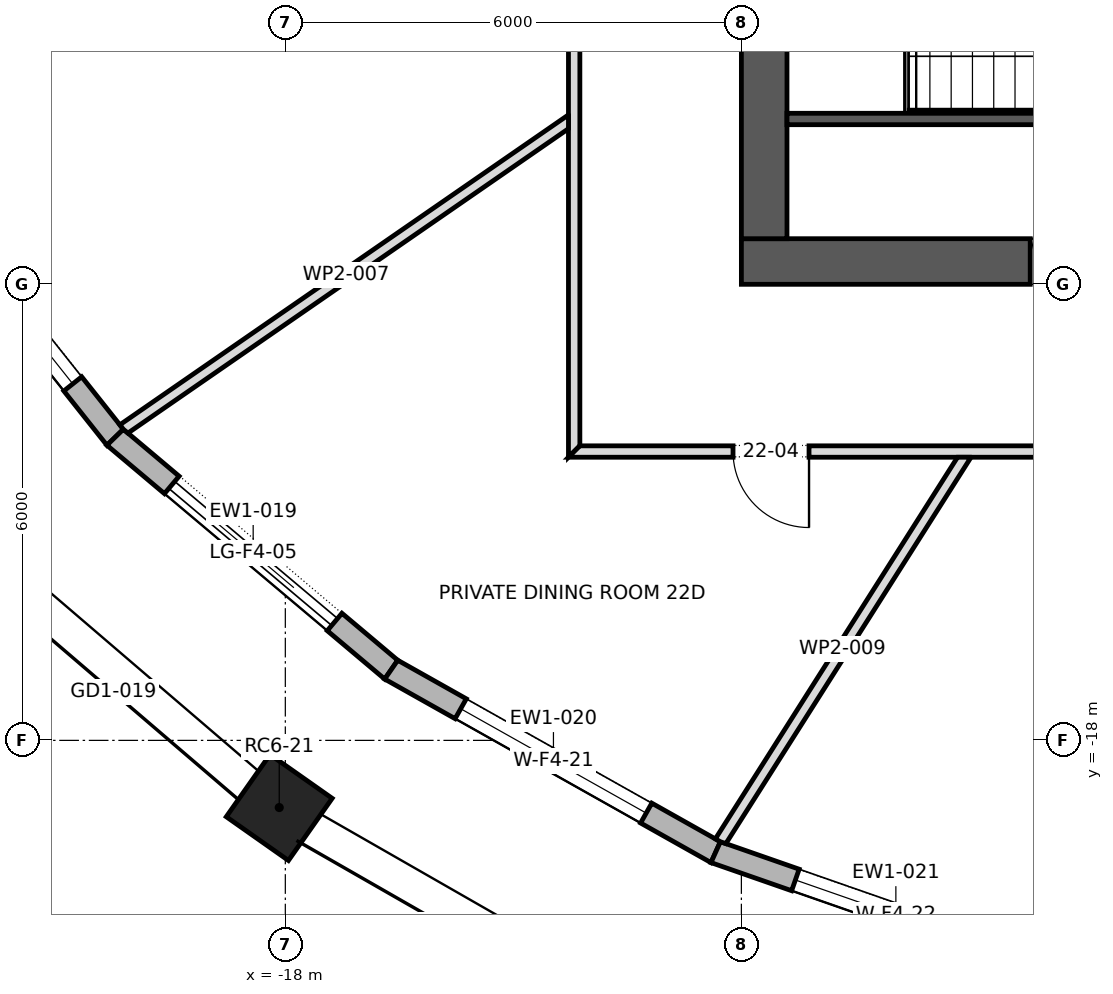
"""IFC4 building model, lengths in metres.
Left out: names, types, materials, properties, quantities, classifications, styles, units other than length and angle.
Written with IfcOpenShell. Run it as: python <this file> out.ifc"""

import sys

from ifc_helpers import new_model, si_unit, direction, frame, frame_2d, origin, origin_2d, place, context, subcontext, project, spatial, polyline, rectangle, outline, extrude, element, fill, save


model = new_model("IFC4")
c1 = context("Model", 3, precision=1e-05, world=origin(), true_north=direction((0.0, 1.0)))
c2 = subcontext(c1, "Body", "Model", "MODEL_VIEW")
j1 = project(units=[si_unit("LENGTHUNIT", "METRE"), si_unit("PLANEANGLEUNIT", "RADIAN")], contexts=[c1])
p1 = place(None, origin())
s1 = spatial("IfcSite", under=j1, at=p1, CompositionType="ELEMENT")
p2 = place(p1, origin())
s2 = spatial("IfcBuilding", under=s1, at=p2, CompositionType="ELEMENT")
p3 = place(p2, frame((0.0, 0.0, 312.3)))
s3 = spatial("IfcBuildingStorey", under=s2, at=p3, CompositionType="ELEMENT", Elevation=312.3)
p4 = place(p3, frame((-18.08, -18.884, 0.0), z_axis=(0.0, 0.0, 1.0), x_axis=(0.817906779671, -0.575350762377, 0.0)))
e1 = element("IfcColumn", 1, at=p4, inside=s3, PredefinedType="COLUMN", context=c2, shape_type="SweptSolid", body=[
    extrude(rectangle(XDim=1.0, YDim=1.0, at=origin_2d()), origin(), (0.0, 0.0, 1.0), 4.0),
])
p5 = place(p3, frame((-12.0, -11.7, 0.0), z_axis=(0.0, 0.0, 1.0), x_axis=(1.0, 0.0, 0.0)))
e2 = element("IfcWall", 2, at=p5, inside=s3, PredefinedType="SHEAR", context=c2, shape_type="SweptSolid", body=[
    extrude(rectangle(XDim=24.0, YDim=0.6, at=frame_2d((12.0, 0.0))), origin(), (0.0, 0.0, 1.0), 4.0),
])
p6 = place(p5, frame((9.975, 0.0, 0.0)))
e3 = element("IfcOpeningElement", 3, at=p6, cuts=e2, PredefinedType="OPENING", context=c2, shape_type="SweptSolid", body=[
    extrude(rectangle(XDim=0.9, YDim=2.1, at=frame_2d((0.45, 1.05))), frame((0.0, 0.312, 0.0), z_axis=(0.0, -1.0, 0.0), x_axis=(1.0, 0.0, 0.0)), (0.0, 0.0, 1.0), 0.624),
])
p7 = place(p5, frame((3.8, 0.0, 0.0)))
e4 = element("IfcOpeningElement", 4, at=p7, cuts=e2, PredefinedType="OPENING", context=c2, shape_type="SweptSolid", body=[
    extrude(rectangle(XDim=0.8, YDim=2.1, at=frame_2d((0.4, 1.05))), frame((0.0, 0.312, 0.0), z_axis=(0.0, -1.0, 0.0), x_axis=(1.0, 0.0, 0.0)), (0.0, 0.0, 1.0), 0.624),
])
p8 = place(p5, frame((5.8, 0.0, 0.0)))
e5 = element("IfcOpeningElement", 5, at=p8, cuts=e2, PredefinedType="OPENING", context=c2, shape_type="SweptSolid", body=[
    extrude(rectangle(XDim=0.8, YDim=2.1, at=frame_2d((0.4, 1.05))), frame((0.0, 0.312, 0.0), z_axis=(0.0, -1.0, 0.0), x_axis=(1.0, 0.0, 0.0)), (0.0, 0.0, 1.0), 0.624),
])
p9 = place(p5, frame((7.5, 0.0, 0.0)))
e6 = element("IfcOpeningElement", 6, at=p9, cuts=e2, PredefinedType="OPENING", context=c2, shape_type="SweptSolid", body=[
    extrude(rectangle(XDim=0.8, YDim=2.1, at=frame_2d((0.4, 1.05))), frame((0.0, 0.312, 0.0), z_axis=(0.0, -1.0, 0.0), x_axis=(1.0, 0.0, 0.0)), (0.0, 0.0, 1.0), 0.624),
])
p10 = place(p5, frame((15.85, 0.0, 0.0)))
e7 = element("IfcOpeningElement", 7, at=p10, cuts=e2, PredefinedType="OPENING", context=c2, shape_type="SweptSolid", body=[
    extrude(rectangle(XDim=0.8, YDim=2.1, at=frame_2d((0.4, 1.05))), frame((0.0, 0.312, 0.0), z_axis=(0.0, -1.0, 0.0), x_axis=(1.0, 0.0, 0.0)), (0.0, 0.0, 1.0), 0.624),
])
p11 = place(p3, frame((-11.7, -11.4, 0.0), z_axis=(0.0, 0.0, 1.0), x_axis=(0.0, 1.0, 0.0)))
e8 = element("IfcWall", 8, at=p11, inside=s3, PredefinedType="SHEAR", context=c2, shape_type="SweptSolid", body=[
    extrude(rectangle(XDim=22.8, YDim=0.6, at=frame_2d((11.4, 0.0))), origin(), (0.0, 0.0, 1.0), 4.0),
])
p12 = place(p11, frame((10.2, 0.0, 0.0)))
e9 = element("IfcOpeningElement", 9, at=p12, cuts=e8, PredefinedType="OPENING", context=c2, shape_type="SweptSolid", body=[
    extrude(rectangle(XDim=2.4, YDim=2.1, at=frame_2d((1.2, 1.05))), frame((0.0, 0.312, 0.0), z_axis=(0.0, -1.0, 0.0), x_axis=(1.0, 0.0, 0.0)), (0.0, 0.0, 1.0), 0.624),
])
p13 = place(p11, frame((18.925, 0.0, 0.0)))
e10 = element("IfcOpeningElement", 10, at=p13, cuts=e8, PredefinedType="OPENING", context=c2, shape_type="SweptSolid", body=[
    extrude(rectangle(XDim=1.2, YDim=2.1, at=frame_2d((0.6, 1.05))), frame((0.0, 0.312, 0.0), z_axis=(0.0, -1.0, 0.0), x_axis=(1.0, 0.0, 0.0)), (0.0, 0.0, 1.0), 0.624),
])
p14 = place(p11, frame((2.675, 0.0, 0.0)))
e11 = element("IfcOpeningElement", 11, at=p14, cuts=e8, PredefinedType="OPENING", context=c2, shape_type="SweptSolid", body=[
    extrude(rectangle(XDim=1.2, YDim=2.1, at=frame_2d((0.6, 1.05))), frame((0.0, 0.312, 0.0), z_axis=(0.0, -1.0, 0.0), x_axis=(1.0, 0.0, 0.0)), (0.0, 0.0, 1.0), 0.624),
])
p15 = place(p3, frame((-23.094, -10.415, 0.0), z_axis=(0.0, 0.0, 1.0), x_axis=(0.621682706372, -0.78326918272, 0.0)))
e12 = element("IfcWall", 12, at=p15, inside=s3, PredefinedType="STANDARD", context=c2, shape_type="SweptSolid", body=[
    extrude(outline(polyline([(-0.016, -0.15), (4.608, -0.15), (4.578, 0.15), (0.016, 0.15), (-0.016, -0.15)])), origin(), (0.0, 0.0, 1.0), 3.7),
])
p16 = place(p15, frame((0.896, 0.0, 0.6)))
e13 = element("IfcOpeningElement", 13, at=p16, cuts=e12, PredefinedType="OPENING", context=c2, shape_type="SweptSolid", body=[
    extrude(rectangle(XDim=2.8, YDim=2.65, at=frame_2d((1.4, 1.325))), frame((0.0, 0.162, 0.0), z_axis=(0.0, -1.0, 0.0), x_axis=(1.0, 0.0, 0.0)), (0.0, 0.0, 1.0), 0.324),
])
p17 = place(p3, frame((-20.239, -14.012, 0.0), z_axis=(0.0, 0.0, 1.0), x_axis=(0.765059193792, -0.643959959931, 0.0)))
e14 = element("IfcWall", 14, at=p17, inside=s3, PredefinedType="STANDARD", context=c2, shape_type="SweptSolid", body=[
    extrude(outline(polyline([(-0.015, -0.15), (4.762, -0.15), (4.734, 0.15), (0.015, 0.15), (-0.015, -0.15)])), origin(), (0.0, 0.0, 1.0), 3.7),
])
p18 = place(p17, frame((0.974, 0.0, 0.0)))
e15 = element("IfcOpeningElement", 15, at=p18, cuts=e14, PredefinedType="OPENING", context=c2, shape_type="SweptSolid", body=[
    extrude(rectangle(XDim=2.8, YDim=3.25, at=frame_2d((1.4, 1.625))), frame((0.0, 0.162, 0.0), z_axis=(0.0, -1.0, 0.0), x_axis=(1.0, 0.0, 0.0)), (0.0, 0.0, 1.0), 0.324),
])
p19 = place(p3, frame((-16.607, -17.07, 0.0), z_axis=(0.0, 0.0, 1.0), x_axis=(0.871570211895, -0.490270706588, 0.0)))
e16 = element("IfcWall", 16, at=p19, inside=s3, PredefinedType="STANDARD", context=c2, shape_type="SweptSolid", body=[
    extrude(outline(polyline([(-0.014, -0.15), (4.911, -0.15), (4.884, 0.15), (0.014, 0.15), (-0.014, -0.15)])), origin(), (0.0, 0.0, 1.0), 3.7),
])
p20 = place(p19, frame((1.049, 0.0, 0.6)))
e17 = element("IfcOpeningElement", 17, at=p20, cuts=e16, PredefinedType="OPENING", context=c2, shape_type="SweptSolid", body=[
    extrude(rectangle(XDim=2.8, YDim=2.65, at=frame_2d((1.4, 1.325))), frame((0.0, 0.162, 0.0), z_axis=(0.0, -1.0, 0.0), x_axis=(1.0, 0.0, 0.0)), (0.0, 0.0, 1.0), 0.324),
])
p21 = place(p3, frame((-12.338, -19.471, 0.0), z_axis=(0.0, 0.0, 1.0), x_axis=(0.944251863618, -0.329223963365, 0.0)))
e18 = element("IfcWall", 18, at=p21, inside=s3, PredefinedType="STANDARD", context=c2, shape_type="SweptSolid", body=[
    extrude(outline(polyline([(-0.013, -0.15), (5.034, -0.15), (5.009, 0.15), (0.013, 0.15), (-0.013, -0.15)])), origin(), (0.0, 0.0, 1.0), 3.7),
])
p22 = place(p21, frame((1.111, 0.0, 0.6)))
e19 = element("IfcOpeningElement", 19, at=p22, cuts=e18, PredefinedType="OPENING", context=c2, shape_type="SweptSolid", body=[
    extrude(rectangle(XDim=2.8, YDim=2.65, at=frame_2d((1.4, 1.325))), frame((0.0, 0.162, 0.0), z_axis=(0.0, -1.0, 0.0), x_axis=(1.0, 0.0, 0.0)), (0.0, 0.0, 1.0), 0.324),
])
p23 = place(p3, frame((-11.4, -9.825, 0.0), z_axis=(0.0, 0.0, 1.0), x_axis=(1.0, 0.0, 0.0)))
e20 = element("IfcWall", 20, at=p23, inside=s3, PredefinedType="SHEAR", context=c2, shape_type="SweptSolid", body=[
    extrude(rectangle(XDim=8.0, YDim=0.15, at=frame_2d((4.0, 0.0))), origin(), (0.0, 0.0, 1.0), 3.7),
])
p24 = place(p3, frame((-14.2, -14.275, 0.0), z_axis=(0.0, 0.0, 1.0), x_axis=(0.0, 1.0, 0.0)))
e21 = element("IfcWall", 21, at=p24, inside=s3, PredefinedType="PARTITIONING", context=c2, shape_type="SweptSolid", body=[
    extrude(outline(polyline([(0.15, -0.075), (2.033, -0.075), (3.917, -0.075), (5.8, -0.075), (7.683, -0.075), (9.567, -0.075), (11.45, -0.075), (13.333, -0.075), (15.217, -0.075), (17.1, -0.075), (18.983, -0.075), (20.866, -0.075), (22.75, -0.075), (24.633, -0.075), (26.517, -0.075), (28.4, -0.075), (28.55, 0.075), (28.55, 0.075), (26.646, 0.075), (24.743, 0.075), (22.84, 0.075), (20.937, 0.075), (19.033, 0.075), (17.13, 0.075), (15.227, 0.075), (13.323, 0.075), (11.42, 0.075), (9.517, 0.075), (7.613, 0.075), (5.71, 0.075), (3.807, 0.075), (1.903, 0.075), (0.0, 0.075), (0.15, -0.075)])), origin(), (0.0, 0.0, 1.0), 3.7),
])
p25 = place(p24, frame((21.465, 0.0, 0.0)))
e22 = element("IfcOpeningElement", 22, at=p25, cuts=e21, PredefinedType="OPENING", context=c2, shape_type="SweptSolid", body=[
    extrude(rectangle(XDim=1.0, YDim=2.1, at=frame_2d((0.5, 1.05))), frame((0.0, 0.087, 0.0), z_axis=(0.0, -1.0, 0.0), x_axis=(1.0, 0.0, 0.0)), (0.0, 0.0, 1.0), 0.174),
])
p26 = place(p24, frame((12.55, 0.0, 0.0)))
e23 = element("IfcOpeningElement", 23, at=p26, cuts=e21, PredefinedType="OPENING", context=c2, shape_type="SweptSolid", body=[
    extrude(rectangle(XDim=1.0, YDim=2.1, at=frame_2d((0.5, 1.05))), frame((0.0, 0.087, 0.0), z_axis=(0.0, -1.0, 0.0), x_axis=(1.0, 0.0, 0.0)), (0.0, 0.0, 1.0), 0.174),
])
p27 = place(p24, frame((7.055, 0.0, 0.0)))
e24 = element("IfcOpeningElement", 24, at=p27, cuts=e21, PredefinedType="OPENING", context=c2, shape_type="SweptSolid", body=[
    extrude(rectangle(XDim=1.0, YDim=2.1, at=frame_2d((0.5, 1.05))), frame((0.0, 0.087, 0.0), z_axis=(0.0, -1.0, 0.0), x_axis=(1.0, 0.0, 0.0)), (0.0, 0.0, 1.0), 0.174),
])
p28 = place(p3, frame((-14.275, -14.2, 0.0), z_axis=(0.0, 0.0, 1.0), x_axis=(1.0, 0.0, 0.0)))
e25 = element("IfcWall", 25, at=p28, inside=s3, PredefinedType="PARTITIONING", context=c2, shape_type="SweptSolid", body=[
    extrude(outline(polyline([(28.55, -0.075), (28.55, -0.075), (28.4, 0.075), (26.517, 0.075), (24.633, 0.075), (22.75, 0.075), (20.866, 0.075), (18.983, 0.075), (17.1, 0.075), (15.217, 0.075), (13.333, 0.075), (11.45, 0.075), (9.567, 0.075), (7.683, 0.075), (5.8, 0.075), (3.917, 0.075), (2.033, 0.075), (0.15, 0.075), (0.0, -0.075), (1.903, -0.075), (3.807, -0.075), (5.71, -0.075), (7.613, -0.075), (9.517, -0.075), (11.42, -0.075), (13.323, -0.075), (15.227, -0.075), (17.13, -0.075), (19.033, -0.075), (20.937, -0.075), (22.84, -0.075), (24.743, -0.075), (26.646, -0.075), (28.55, -0.075)])), origin(), (0.0, 0.0, 1.0), 3.7),
])
p29 = place(p28, frame((2.165, 0.0, 0.0)))
e26 = element("IfcOpeningElement", 26, at=p29, cuts=e25, PredefinedType="OPENING", context=c2, shape_type="SweptSolid", body=[
    extrude(rectangle(XDim=1.0, YDim=2.1, at=frame_2d((0.5, 1.05))), frame((0.0, 0.087, 0.0), z_axis=(0.0, -1.0, 0.0), x_axis=(1.0, 0.0, 0.0)), (0.0, 0.0, 1.0), 0.174),
])
p30 = place(p28, frame((11.825, 0.0, 0.0)))
e27 = element("IfcOpeningElement", 27, at=p30, cuts=e25, PredefinedType="OPENING", context=c2, shape_type="SweptSolid", body=[
    extrude(rectangle(XDim=1.0, YDim=2.1, at=frame_2d((0.5, 1.05))), frame((0.0, 0.087, 0.0), z_axis=(0.0, -1.0, 0.0), x_axis=(1.0, 0.0, 0.0)), (0.0, 0.0, 1.0), 0.174),
])
p31 = place(p28, frame((23.255, 0.0, 0.0)))
e28 = element("IfcOpeningElement", 28, at=p31, cuts=e25, PredefinedType="OPENING", context=c2, shape_type="SweptSolid", body=[
    extrude(rectangle(XDim=1.0, YDim=2.1, at=frame_2d((0.5, 1.05))), frame((0.0, 0.087, 0.0), z_axis=(0.0, -1.0, 0.0), x_axis=(1.0, 0.0, 0.0)), (0.0, 0.0, 1.0), 0.174),
])
p32 = place(p3, frame((-14.232, -9.833, 0.0), z_axis=(0.0, 0.0, 1.0), x_axis=(-0.822725997435, -0.568438152436, 0.0)))
e29 = element("IfcWall", 29, at=p32, inside=s3, PredefinedType="PARTITIONING", context=c2, shape_type="SweptSolid", body=[
    extrude(outline(polyline([(0.0, -0.075), (1.793, -0.075), (3.587, -0.075), (5.38, -0.075), (7.174, -0.075), (7.169, -0.001), (7.148, 0.075), (5.387, 0.075), (3.626, 0.075), (1.865, 0.075), (0.104, 0.075), (0.0, -0.075), (0.0, -0.075)])), origin(), (0.0, 0.0, 1.0), 3.7),
])
p33 = place(p3, frame((-9.042, -14.235, 0.0), z_axis=(0.0, 0.0, 1.0), x_axis=(-0.535766262989, -0.844366337228, 0.0)))
e30 = element("IfcWall", 30, at=p33, inside=s3, PredefinedType="PARTITIONING", context=c2, shape_type="SweptSolid", body=[
    extrude(outline(polyline([(6.041, -0.075), (6.041, -0.067), (6.037, 0.001), (6.02, 0.075), (4.515, 0.075), (3.01, 0.075), (1.505, 0.075), (0.0, 0.075), (0.0, 0.074), (0.095, -0.075), (2.077, -0.075), (4.059, -0.075), (6.041, -0.075)])), origin(), (0.0, 0.0, 1.0), 3.7),
])
p34 = place(p16, origin())
e31 = element("IfcWindow", 31, at=p34, inside=s3, PartitioningType="DOUBLE_PANEL_VERTICAL", PredefinedType="WINDOW", context=c2, shape_type="SweptSolid", body=[
    extrude(rectangle(XDim=2.8, YDim=2.65, at=frame_2d((1.4, 1.325))), frame((0.0, 0.03, 0.0), z_axis=(0.0, -1.0, 0.0), x_axis=(1.0, 0.0, 0.0)), (0.0, 0.0, 1.0), 0.06),
])
fill(e13, e31)
p35 = place(p18, origin())
e32 = element("IfcDoor", 32, at=p35, inside=s3, OperationType="DOUBLE_DOOR_SLIDING", PredefinedType="DOOR", context=c2, shape_type="SweptSolid", body=[
    extrude(rectangle(XDim=2.8, YDim=3.25, at=frame_2d((1.4, 1.625))), frame((0.0, 0.025, 0.0), z_axis=(0.0, -1.0, 0.0), x_axis=(1.0, 0.0, 0.0)), (0.0, 0.0, 1.0), 0.05),
])
fill(e15, e32)
p36 = place(p20, origin())
e33 = element("IfcWindow", 33, at=p36, inside=s3, PartitioningType="DOUBLE_PANEL_VERTICAL", PredefinedType="WINDOW", context=c2, shape_type="SweptSolid", body=[
    extrude(rectangle(XDim=2.8, YDim=2.65, at=frame_2d((1.4, 1.325))), frame((0.0, 0.03, 0.0), z_axis=(0.0, -1.0, 0.0), x_axis=(1.0, 0.0, 0.0)), (0.0, 0.0, 1.0), 0.06),
])
fill(e17, e33)
p37 = place(p22, origin())
e34 = element("IfcWindow", 34, at=p37, inside=s3, PartitioningType="DOUBLE_PANEL_VERTICAL", PredefinedType="WINDOW", context=c2, shape_type="SweptSolid", body=[
    extrude(rectangle(XDim=2.8, YDim=2.65, at=frame_2d((1.4, 1.325))), frame((0.0, 0.03, 0.0), z_axis=(0.0, -1.0, 0.0), x_axis=(1.0, 0.0, 0.0)), (0.0, 0.0, 1.0), 0.06),
])
fill(e19, e34)
p38 = place(p7, origin())
e35 = element("IfcDoor", 35, at=p38, inside=s3, OperationType="SINGLE_SWING_LEFT", PredefinedType="DOOR", context=c2, shape_type="SweptSolid", body=[
    extrude(rectangle(XDim=0.8, YDim=2.1, at=frame_2d((0.4, 1.05))), frame((0.0, 0.025, 0.0), z_axis=(0.0, -1.0, 0.0), x_axis=(1.0, 0.0, 0.0)), (0.0, 0.0, 1.0), 0.05),
])
fill(e4, e35)
p39 = place(p29, frame((1.0, 0.0, 0.0), z_axis=(0.0, 0.0, 1.0), x_axis=(-1.0, 0.0, 0.0)))
e36 = element("IfcDoor", 36, at=p39, inside=s3, OperationType="SINGLE_SWING_RIGHT", PredefinedType="DOOR", context=c2, shape_type="SweptSolid", body=[
    extrude(rectangle(XDim=1.0, YDim=2.1, at=frame_2d((0.5, 1.05))), frame((0.0, 0.025, 0.0), z_axis=(0.0, -1.0, 0.0), x_axis=(1.0, 0.0, 0.0)), (0.0, 0.0, 1.0), 0.05),
])
fill(e26, e36)
save(model, sys.argv[1])
